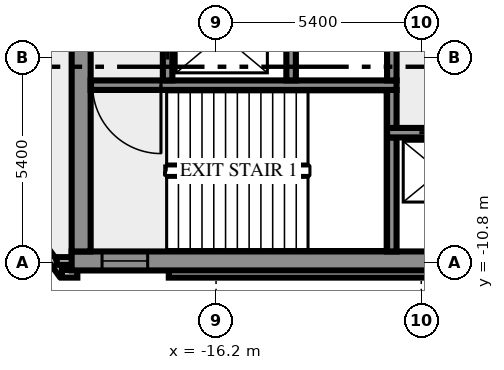
"""IFC4 building model, lengths in metres.
Left out: names, types, materials, properties, quantities, classifications, styles, units other than length and angle.
Written with IfcOpenShell. Run it as: python <this file> out.ifc"""

import sys

from ifc_helpers import new_model, si_unit, direction, frame, frame_2d, origin, place, context, subcontext, project, spatial, rectangle, extrude, element, fill, save


model = new_model("IFC4")
c1 = context("Model", 3, precision=1e-05, world=origin(), true_north=direction((0.0, 1.0)))
c2 = subcontext(c1, "Body", "Model", "MODEL_VIEW")
j1 = project(units=[si_unit("LENGTHUNIT", "METRE"), si_unit("PLANEANGLEUNIT", "RADIAN")], contexts=[c1])
p1 = place(None, origin())
s1 = spatial("IfcSite", under=j1, at=p1, CompositionType="ELEMENT")
p2 = place(p1, origin())
s2 = spatial("IfcBuilding", under=s1, at=p2, CompositionType="ELEMENT")
p3 = place(p2, frame((0.0, 0.0, 101.0)))
s3 = spatial("IfcBuildingStorey", under=s2, at=p3, CompositionType="ELEMENT", Elevation=101.0)
p4 = place(p3, frame((-21.833, -8.909, 0.0), z_axis=(0.0, 0.0, 1.0), x_axis=(0.587766567315, -0.809030569476, 0.0)))
e1 = element("IfcWall", 1, at=p4, inside=s3, PredefinedType="SOLIDWALL", context=c2, shape_type="SweptSolid", body=[
    extrude(rectangle(XDim=2.688, YDim=0.2, at=frame_2d((1.344, 0.0))), origin(), (0.0, 0.0, 1.0), 3.65),
])
p5 = place(p3, frame((-20.256, -11.088, 0.0), z_axis=(0.0, 0.0, 1.0), x_axis=(1.0, 0.0, 0.0)))
e2 = element("IfcWall", 2, at=p5, inside=s3, PredefinedType="SOLIDWALL", context=c2, shape_type="SweptSolid", body=[
    extrude(rectangle(XDim=0.406, YDim=0.2, at=frame_2d((0.203, 0.0))), origin(), (0.0, 0.0, 1.0), 3.65),
])
p6 = place(p3, frame((-17.444, -11.088, 0.0), z_axis=(0.0, 0.0, 1.0), x_axis=(1.0, 0.0, 0.0)))
e3 = element("IfcWall", 3, at=p6, inside=s3, PredefinedType="SOLIDWALL", context=c2, shape_type="SweptSolid", body=[
    extrude(rectangle(XDim=34.888, YDim=0.2, at=frame_2d((17.444, 0.0))), origin(), (0.0, 0.0, 1.0), 3.65),
])
p7 = place(p3, frame((-19.98, -10.75, 0.0), z_axis=(0.0, 0.0, 1.0), x_axis=(-1.0, 0.0, 0.0)))
e4 = element("IfcWall", 4, at=p7, inside=s3, PredefinedType="SOLIDWALL", context=c2, shape_type="SweptSolid", body=[
    extrude(rectangle(XDim=0.417, YDim=0.2, at=frame_2d((0.208, 0.0))), origin(), (0.0, 0.0, 1.0), 3.65),
])
p8 = place(p3, frame((-20.0, -10.75, 0.0), z_axis=(0.0, 0.0, 1.0), x_axis=(1.0, 0.0, 0.0)))
e5 = element("IfcWall", 5, at=p8, inside=s3, PredefinedType="SHEAR", context=c2, shape_type="SweptSolid", body=[
    extrude(rectangle(XDim=40.0, YDim=0.5, at=frame_2d((20.0, 0.0))), origin(), (0.0, 0.0, 1.0), 3.65),
])
p9 = place(p8, frame((0.8, 0.0, 1.0)))
e6 = element("IfcOpeningElement", 6, at=p9, cuts=e5, PredefinedType="OPENING", context=c2, shape_type="SweptSolid", body=[
    extrude(rectangle(XDim=1.2, YDim=1.2, at=frame_2d((0.6, 0.6))), frame((0.0, 0.26, 0.0), z_axis=(0.0, -1.0, 0.0), x_axis=(1.0, 0.0, 0.0)), (0.0, 0.0, 1.0), 0.52),
])
p10 = place(p8, frame((38.0, 0.0, 1.0)))
e7 = element("IfcOpeningElement", 7, at=p10, cuts=e5, PredefinedType="OPENING", context=c2, shape_type="SweptSolid", body=[
    extrude(rectangle(XDim=1.2, YDim=1.2, at=frame_2d((0.6, 0.6))), frame((0.0, 0.26, 0.0), z_axis=(0.0, -1.0, 0.0), x_axis=(1.0, 0.0, 0.0)), (0.0, 0.0, 1.0), 0.52),
])
p11 = place(p3, frame((-19.75, -10.5, 0.0), z_axis=(0.0, 0.0, 1.0), x_axis=(0.0, 1.0, 0.0)))
e8 = element("IfcWall", 8, at=p11, inside=s3, PredefinedType="SHEAR", context=c2, shape_type="SweptSolid", body=[
    extrude(rectangle(XDim=8.8, YDim=0.5, at=frame_2d((4.4, 0.0))), origin(), (0.0, 0.0, 1.0), 3.65),
])
p12 = place(p3, frame((-11.575, -10.5, 0.0), z_axis=(0.0, 0.0, 1.0), x_axis=(0.0, 1.0, 0.0)))
e9 = element("IfcWall", 9, at=p12, inside=s3, PredefinedType="SHEAR", context=c2, shape_type="SweptSolid", body=[
    extrude(rectangle(XDim=3.0, YDim=0.25, at=frame_2d((1.5, 0.0))), origin(), (0.0, 0.0, 1.0), 3.65),
])
p13 = place(p3, frame((11.7, -7.375, 0.0), z_axis=(0.0, 0.0, 1.0), x_axis=(-1.0, 0.0, 0.0)))
e10 = element("IfcWall", 10, at=p13, inside=s3, PredefinedType="SHEAR", context=c2, shape_type="SweptSolid", body=[
    extrude(rectangle(XDim=23.4, YDim=0.25, at=frame_2d((11.7, 0.0))), origin(), (0.0, 0.0, 1.0), 3.65),
])
p14 = place(p13, frame((21.45, 0.0, 0.0)))
e11 = element("IfcOpeningElement", 11, at=p14, cuts=e10, PredefinedType="OPENING", context=c2, shape_type="SweptSolid", body=[
    extrude(rectangle(XDim=1.1, YDim=2.1, at=frame_2d((0.55, 1.05))), frame((0.0, 0.135, 0.0), z_axis=(0.0, -1.0, 0.0), x_axis=(1.0, 0.0, 0.0)), (0.0, 0.0, 1.0), 0.27),
])
p15 = place(p13, frame((18.95, 0.0, 0.0)))
e12 = element("IfcOpeningElement", 12, at=p15, cuts=e10, PredefinedType="OPENING", context=c2, shape_type="SweptSolid", body=[
    extrude(rectangle(XDim=1.1, YDim=2.1, at=frame_2d((0.55, 1.05))), frame((0.0, 0.135, 0.0), z_axis=(0.0, -1.0, 0.0), x_axis=(1.0, 0.0, 0.0)), (0.0, 0.0, 1.0), 0.27),
])
p16 = place(p13, frame((16.45, 0.0, 0.0)))
e13 = element("IfcOpeningElement", 13, at=p16, cuts=e10, PredefinedType="OPENING", context=c2, shape_type="SweptSolid", body=[
    extrude(rectangle(XDim=1.1, YDim=2.1, at=frame_2d((0.55, 1.05))), frame((0.0, 0.135, 0.0), z_axis=(0.0, -1.0, 0.0), x_axis=(1.0, 0.0, 0.0)), (0.0, 0.0, 1.0), 0.27),
])
p17 = place(p13, frame((14.65, 0.0, 0.0)))
e14 = element("IfcOpeningElement", 14, at=p17, cuts=e10, PredefinedType="OPENING", context=c2, shape_type="SweptSolid", body=[
    extrude(rectangle(XDim=0.8, YDim=2.1, at=frame_2d((0.4, 1.05))), frame((0.0, 0.135, 0.0), z_axis=(0.0, -1.0, 0.0), x_axis=(1.0, 0.0, 0.0)), (0.0, 0.0, 1.0), 0.27),
])
p18 = place(p13, frame((12.8, 0.0, 0.0)))
e15 = element("IfcOpeningElement", 15, at=p18, cuts=e10, PredefinedType="OPENING", context=c2, shape_type="SweptSolid", body=[
    extrude(rectangle(XDim=0.9, YDim=2.1, at=frame_2d((0.45, 1.05))), frame((0.0, 0.135, 0.0), z_axis=(0.0, -1.0, 0.0), x_axis=(1.0, 0.0, 0.0)), (0.0, 0.0, 1.0), 0.27),
])
p19 = place(p13, frame((10.7, 0.0, 0.0)))
e16 = element("IfcOpeningElement", 16, at=p19, cuts=e10, PredefinedType="OPENING", context=c2, shape_type="SweptSolid", body=[
    extrude(rectangle(XDim=0.9, YDim=2.1, at=frame_2d((0.45, 1.05))), frame((0.0, 0.135, 0.0), z_axis=(0.0, -1.0, 0.0), x_axis=(1.0, 0.0, 0.0)), (0.0, 0.0, 1.0), 0.27),
])
p20 = place(p3, frame((-11.575, -7.25, 0.0), z_axis=(0.0, 0.0, 1.0), x_axis=(0.0, 1.0, 0.0)))
e17 = element("IfcWall", 17, at=p20, inside=s3, PredefinedType="SHEAR", context=c2, shape_type="SweptSolid", body=[
    extrude(rectangle(XDim=1.0, YDim=0.25, at=frame_2d((0.5, 0.0))), origin(), (0.0, 0.0, 1.0), 3.65),
])
p21 = place(p3, frame((-11.45, -6.125, 0.0), z_axis=(0.0, 0.0, 1.0), x_axis=(-1.0, 0.0, 0.0)))
e18 = element("IfcWall", 18, at=p21, inside=s3, PredefinedType="SHEAR", context=c2, shape_type="SweptSolid", body=[
    extrude(rectangle(XDim=8.05, YDim=0.25, at=frame_2d((4.025, 0.0))), origin(), (0.0, 0.0, 1.0), 3.65),
])
p22 = place(p21, frame((6.2, 0.0, 0.0)))
e19 = element("IfcOpeningElement", 19, at=p22, cuts=e18, PredefinedType="OPENING", context=c2, shape_type="SweptSolid", body=[
    extrude(rectangle(XDim=1.8, YDim=2.1, at=frame_2d((0.9, 1.05))), frame((0.0, 0.135, 0.0), z_axis=(0.0, -1.0, 0.0), x_axis=(1.0, 0.0, 0.0)), (0.0, 0.0, 1.0), 0.27),
])
p23 = place(p3, frame((-17.475, -6.0, 0.0), z_axis=(0.0, 0.0, 1.0), x_axis=(0.0, 1.0, 0.0)))
e20 = element("IfcWall", 20, at=p23, inside=s3, PredefinedType="SHEAR", context=c2, shape_type="SweptSolid", body=[
    extrude(rectangle(XDim=4.3, YDim=0.25, at=frame_2d((2.15, 0.0))), origin(), (0.0, 0.0, 1.0), 3.65),
])
p24 = place(p23, frame((0.55, 0.0, 0.0)))
e21 = element("IfcOpeningElement", 21, at=p24, cuts=e20, PredefinedType="OPENING", context=c2, shape_type="SweptSolid", body=[
    extrude(rectangle(XDim=1.3, YDim=2.1, at=frame_2d((0.65, 1.05))), frame((0.0, 0.135, 0.0), z_axis=(0.0, -1.0, 0.0), x_axis=(1.0, 0.0, 0.0)), (0.0, 0.0, 1.0), 0.27),
])
for number, where, z_axis, x_axis in (
    (22, (-14.225, -6.0, 0.0), (0.0, 0.0, 1.0), (0.0, 1.0, 0.0)),
    (23, (-11.575, -6.0, 0.0), (0.0, 0.0, 1.0), (0.0, 1.0, 0.0)),
):
    element("IfcWall", number, at=place(p3, frame(where, z_axis=z_axis, x_axis=x_axis)), inside=s3, PredefinedType="SHEAR", context=c2, shape_type="SweptSolid", body=[
        extrude(rectangle(XDim=1.75, YDim=0.25, at=frame_2d((0.875, 0.0))), origin(), (0.0, 0.0, 1.0), 3.65),
    ])
p25 = place(p9, origin())
e24 = element("IfcWindow", 24, at=p25, inside=s3, PartitioningType="SINGLE_PANEL", PredefinedType="WINDOW", context=c2, shape_type="SweptSolid", body=[
    extrude(rectangle(XDim=1.2, YDim=1.2, at=frame_2d((0.6, 0.6))), frame((0.0, 0.03, 0.0), z_axis=(0.0, -1.0, 0.0), x_axis=(1.0, 0.0, 0.0)), (0.0, 0.0, 1.0), 0.06),
])
fill(e6, e24)
p26 = place(p14, origin())
e25 = element("IfcDoor", 25, at=p26, inside=s3, OperationType="DOUBLE_DOOR_SLIDING", PredefinedType="DOOR", context=c2, shape_type="SweptSolid", body=[
    extrude(rectangle(XDim=1.1, YDim=2.1, at=frame_2d((0.55, 1.05))), frame((0.0, 0.025, 0.0), z_axis=(0.0, -1.0, 0.0), x_axis=(1.0, 0.0, 0.0)), (0.0, 0.0, 1.0), 0.05),
])
fill(e11, e25)
p27 = place(p22, origin())
e26 = element("IfcDoor", 26, at=p27, inside=s3, OperationType="DOUBLE_DOOR_SINGLE_SWING", PredefinedType="DOOR", context=c2, shape_type="SweptSolid", body=[
    extrude(rectangle(XDim=1.8, YDim=2.1, at=frame_2d((0.9, 1.05))), frame((0.0, 0.025, 0.0), z_axis=(0.0, -1.0, 0.0), x_axis=(1.0, 0.0, 0.0)), (0.0, 0.0, 1.0), 0.05),
])
fill(e19, e26)
p28 = place(p24, origin())
e27 = element("IfcDoor", 27, at=p28, inside=s3, OperationType="DOUBLE_DOOR_SLIDING", PredefinedType="DOOR", context=c2, shape_type="SweptSolid", body=[
    extrude(rectangle(XDim=1.3, YDim=2.1, at=frame_2d((0.65, 1.05))), frame((0.0, 0.025, 0.0), z_axis=(0.0, -1.0, 0.0), x_axis=(1.0, 0.0, 0.0)), (0.0, 0.0, 1.0), 0.05),
])
fill(e21, e27)
save(model, sys.argv[1])
